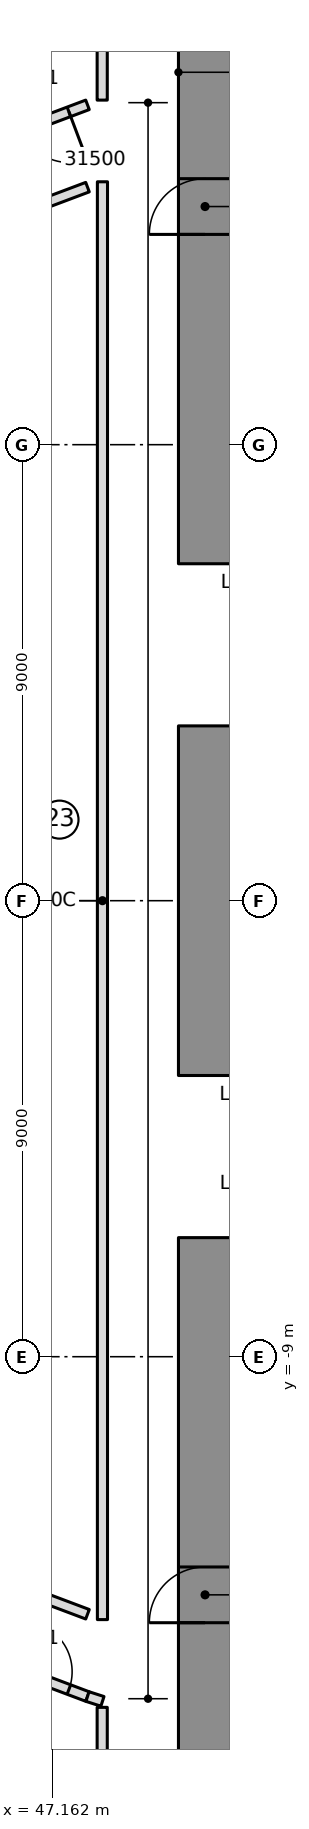
"""IFC4 building model, lengths in metres.
Left out: names, types, materials, properties, quantities, classifications, styles, units other than length and angle.
Written with IfcOpenShell. Run it as: python <this file> out.ifc"""

import sys

from ifc_helpers import new_model, si_unit, direction, frame, frame_2d, origin, place, context, subcontext, project, spatial, rectangle, extrude, element, fill, save


model = new_model("IFC4")
c1 = context("Model", 3, precision=1e-05, world=origin(), true_north=direction((0.0, 1.0)))
c2 = subcontext(c1, "Body", "Model", "MODEL_VIEW")
j1 = project(units=[si_unit("LENGTHUNIT", "METRE"), si_unit("PLANEANGLEUNIT", "RADIAN")], contexts=[c1])
p1 = place(None, origin())
s1 = spatial("IfcSite", under=j1, at=p1, CompositionType="ELEMENT")
p2 = place(p1, origin())
s2 = spatial("IfcBuilding", under=s1, at=p2, CompositionType="ELEMENT")
p3 = place(p2, frame((0.0, 0.0, 116.85)))
s3 = spatial("IfcBuildingStorey", under=s2, at=p3, CompositionType="ELEMENT", Elevation=116.85)
p4 = place(p3, frame((50.175, 6.65, 0.0), z_axis=(0.0, 0.0, 1.0), x_axis=(0.0, 1.0, 0.0)))
e1 = element("IfcWall", 1, at=p4, inside=s3, PredefinedType="SHEAR", context=c2, shape_type="SweptSolid", body=[
    extrude(rectangle(XDim=10.15, YDim=1.05, at=frame_2d((5.075, 0.0))), origin(), (0.0, 0.0, 1.0), 3.55),
])
p5 = place(p4, frame((6.5, 0.0, 0.0)))
e2 = element("IfcOpeningElement", 2, at=p5, cuts=e1, PredefinedType="OPENING", context=c2, shape_type="SweptSolid", body=[
    extrude(rectangle(XDim=1.1, YDim=2.1, at=frame_2d((0.55, 1.05))), frame((0.0, 0.535, 0.0), z_axis=(0.0, -1.0, 0.0), x_axis=(1.0, 0.0, 0.0)), (0.0, 0.0, 1.0), 1.07),
])
p6 = place(p3, frame((50.175, -3.45, 0.0), z_axis=(0.0, 0.0, 1.0), x_axis=(0.0, 1.0, 0.0)))
e3 = element("IfcWall", 3, at=p6, inside=s3, PredefinedType="SHEAR", context=c2, shape_type="SweptSolid", body=[
    extrude(rectangle(XDim=6.9, YDim=1.05, at=frame_2d((3.45, 0.0))), origin(), (0.0, 0.0, 1.0), 3.55),
])
p7 = place(p3, frame((50.175, -16.8, 0.0), z_axis=(0.0, 0.0, 1.0), x_axis=(0.0, 1.0, 0.0)))
e4 = element("IfcWall", 4, at=p7, inside=s3, PredefinedType="SHEAR", context=c2, shape_type="SweptSolid", body=[
    extrude(rectangle(XDim=10.15, YDim=1.05, at=frame_2d((5.075, 0.0))), origin(), (0.0, 0.0, 1.0), 3.55),
])
p8 = place(p7, frame((2.55, 0.0, 0.0)))
e5 = element("IfcOpeningElement", 5, at=p8, cuts=e4, PredefinedType="OPENING", context=c2, shape_type="SweptSolid", body=[
    extrude(rectangle(XDim=1.1, YDim=2.1, at=frame_2d((0.55, 1.05))), frame((0.0, 0.535, 0.0), z_axis=(0.0, -1.0, 0.0), x_axis=(1.0, 0.0, 0.0)), (0.0, 0.0, 1.0), 1.07),
])
p9 = place(p3, frame((47.855, 15.707, 0.0), z_axis=(0.0, 0.0, 1.0), x_axis=(-0.935895556609, -0.352277599513, 0.0)))
e6 = element("IfcWall", 6, at=p9, inside=s3, PredefinedType="PARTITIONING", context=c2, shape_type="SweptSolid", body=[
    extrude(rectangle(XDim=1.785, YDim=0.2, at=frame_2d((0.892, 0.0))), origin(), (0.0, 0.0, 1.0), 3.15),
])
p10 = place(p9, frame((0.392, 0.0, 0.0)))
e7 = element("IfcOpeningElement", 7, at=p10, cuts=e6, PredefinedType="OPENING", context=c2, shape_type="SweptSolid", body=[
    extrude(rectangle(XDim=1.0, YDim=2.1, at=frame_2d((0.5, 1.05))), frame((0.0, 0.11, 0.0), z_axis=(0.0, -1.0, 0.0), x_axis=(1.0, 0.0, 0.0)), (0.0, 0.0, 1.0), 0.22),
])
p11 = place(p3, frame((46.185, -15.079, 0.0), z_axis=(0.0, 0.0, 1.0), x_axis=(0.935895556609, -0.352277599513, 0.0)))
e8 = element("IfcWall", 8, at=p11, inside=s3, PredefinedType="PARTITIONING", context=c2, shape_type="SweptSolid", body=[
    extrude(rectangle(XDim=1.785, YDim=0.2, at=frame_2d((0.892, 0.0))), origin(), (0.0, 0.0, 1.0), 3.15),
])
p12 = place(p11, frame((0.392, 0.0, 0.0)))
e9 = element("IfcOpeningElement", 9, at=p12, cuts=e8, PredefinedType="OPENING", context=c2, shape_type="SweptSolid", body=[
    extrude(rectangle(XDim=1.0, YDim=2.1, at=frame_2d((0.5, 1.05))), frame((0.0, 0.11, 0.0), z_axis=(0.0, -1.0, 0.0), x_axis=(1.0, 0.0, 0.0)), (0.0, 0.0, 1.0), 0.22),
])
for number, where, z_axis, x_axis in (
    (10, (46.696, 13.647, 0.0), (0.0, 0.0, 1.0), (0.936, 0.352, 0.0)),
    (11, (47.855, -14.083, 0.0), (0.0, 0.0, 1.0), (-0.936, 0.352, 0.0)),
):
    element("IfcWall", number, at=place(p3, frame(where, z_axis=z_axis, x_axis=x_axis)), inside=s3, PredefinedType="PARTITIONING", context=c2, shape_type="SweptSolid", body=[
        extrude(rectangle(XDim=1.239, YDim=0.2, at=frame_2d((0.619, 0.0))), origin(), (0.0, 0.0, 1.0), 3.15),
    ])
p13 = place(p3, frame((48.15, 14.189, 0.0), z_axis=(0.0, 0.0, 1.0), x_axis=(0.0, -1.0, 0.0)))
e12 = element("IfcWall", 12, at=p13, inside=s3, PredefinedType="PARTITIONING", context=c2, shape_type="SweptSolid", body=[
    extrude(rectangle(XDim=28.377, YDim=0.2, at=frame_2d((14.189, 0.0))), origin(), (0.0, 0.0, 1.0), 3.15),
])
p14 = place(p3, frame((48.146, 20.533, 0.0), z_axis=(0.0, 0.0, 1.0), x_axis=(-0.000103183201, -0.999999994677, 0.0)))
e13 = element("IfcWall", 13, at=p14, inside=s3, PredefinedType="PARTITIONING", context=c2, shape_type="SweptSolid", body=[
    extrude(rectangle(XDim=4.732, YDim=0.2, at=frame_2d((2.366, 0.0))), origin(), (0.0, 0.0, 1.0), 3.15),
])
p15 = place(p3, frame((47.855, -15.707, 0.0), z_axis=(0.0, 0.0, 1.0), x_axis=(0.952167766291, -0.305575759571, 0.0)))
e14 = element("IfcWall", 14, at=p15, inside=s3, PredefinedType="PARTITIONING", context=c2, shape_type="SweptSolid", body=[
    extrude(rectangle(XDim=0.31, YDim=0.2, at=frame_2d((0.155, 0.0))), origin(), (0.0, 0.0, 1.0), 3.15),
])
p16 = place(p3, frame((48.145, -15.92, 0.0), z_axis=(0.0, 0.0, 1.0), x_axis=(-5.1610239e-05, -0.999999998668, 0.0)))
e15 = element("IfcWall", 15, at=p16, inside=s3, PredefinedType="PARTITIONING", context=c2, shape_type="SweptSolid", body=[
    extrude(rectangle(XDim=4.73, YDim=0.2, at=frame_2d((2.365, 0.0))), origin(), (0.0, 0.0, 1.0), 3.15),
])
p17 = place(p10, origin())
e16 = element("IfcDoor", 16, at=p17, inside=s3, OperationType="SINGLE_SWING_LEFT", PredefinedType="DOOR", context=c2, shape_type="SweptSolid", body=[
    extrude(rectangle(XDim=1.0, YDim=2.1, at=frame_2d((0.5, 1.05))), frame((0.0, 0.025, 0.0), z_axis=(0.0, -1.0, 0.0), x_axis=(1.0, 0.0, 0.0)), (0.0, 0.0, 1.0), 0.05),
])
fill(e7, e16)
p18 = place(p12, origin())
e17 = element("IfcDoor", 17, at=p18, inside=s3, OperationType="SINGLE_SWING_LEFT", PredefinedType="DOOR", context=c2, shape_type="SweptSolid", body=[
    extrude(rectangle(XDim=1.0, YDim=2.1, at=frame_2d((0.5, 1.05))), frame((0.0, 0.025, 0.0), z_axis=(0.0, -1.0, 0.0), x_axis=(1.0, 0.0, 0.0)), (0.0, 0.0, 1.0), 0.05),
])
fill(e9, e17)
p19 = place(p5, origin())
e18 = element("IfcDoor", 18, at=p19, inside=s3, OperationType="SINGLE_SWING_RIGHT", PredefinedType="DOOR", context=c2, shape_type="SweptSolid", body=[
    extrude(rectangle(XDim=1.1, YDim=2.1, at=frame_2d((0.55, 1.05))), frame((0.0, 0.025, 0.0), z_axis=(0.0, -1.0, 0.0), x_axis=(1.0, 0.0, 0.0)), (0.0, 0.0, 1.0), 0.05),
])
fill(e2, e18)
p20 = place(p8, origin())
e19 = element("IfcDoor", 19, at=p20, inside=s3, OperationType="SINGLE_SWING_RIGHT", PredefinedType="DOOR", context=c2, shape_type="SweptSolid", body=[
    extrude(rectangle(XDim=1.1, YDim=2.1, at=frame_2d((0.55, 1.05))), frame((0.0, 0.025, 0.0), z_axis=(0.0, -1.0, 0.0), x_axis=(1.0, 0.0, 0.0)), (0.0, 0.0, 1.0), 0.05),
])
fill(e5, e19)
save(model, sys.argv[1])
